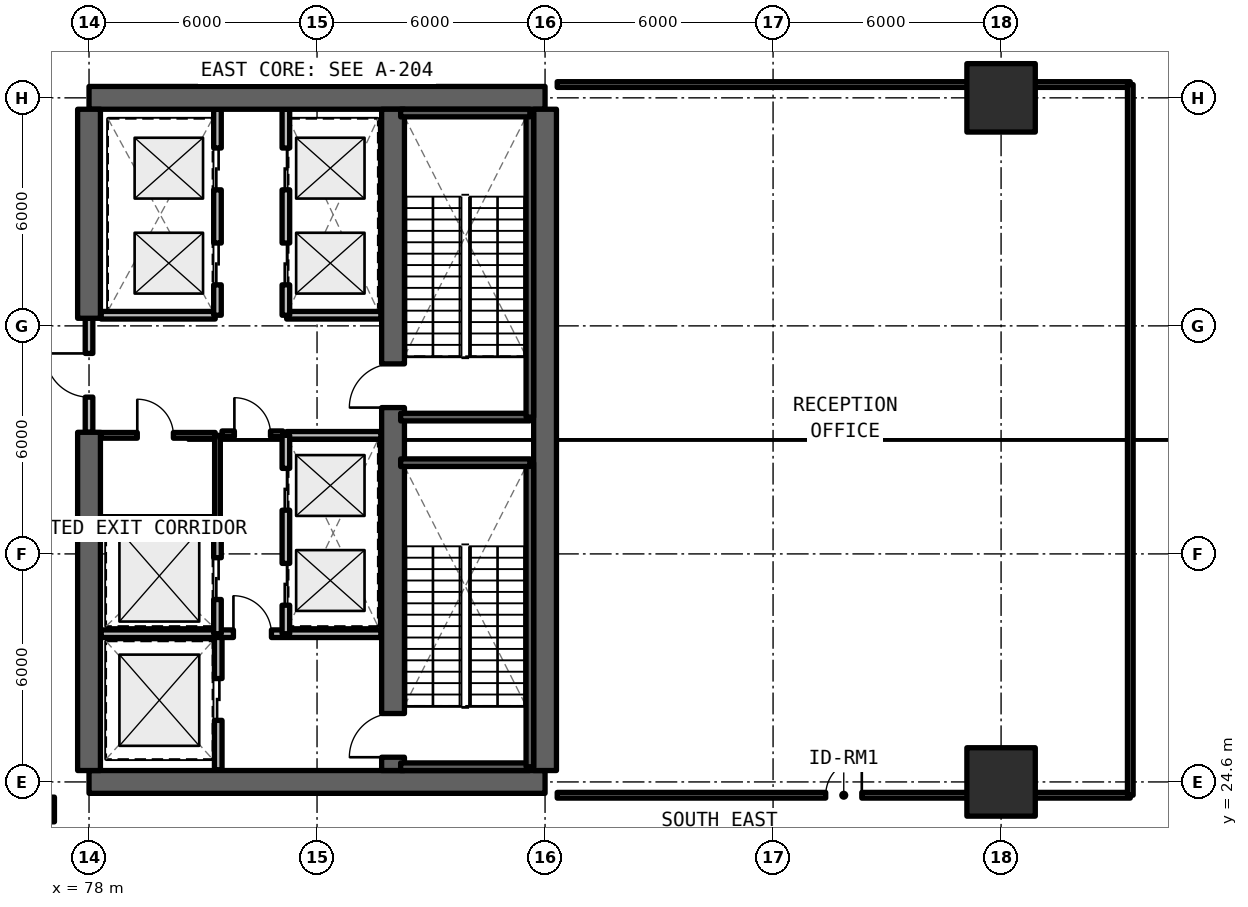
"""IFC4 building model, lengths in metres.
Left out: names, types, materials, properties, quantities, classifications, styles, units other than length and angle.
Written with IfcOpenShell. Run it as: python <this file> out.ifc"""

import sys

from ifc_helpers import new_model, si_unit, direction, frame, frame_2d, origin, origin_2d, place, context, subcontext, project, spatial, rectangle, extrude, element, fill, save


model = new_model("IFC4")
c1 = context("Model", 3, precision=1e-05, world=origin(), true_north=direction((0.0, 1.0)))
c2 = subcontext(c1, "Body", "Model", "MODEL_VIEW")
j1 = project(units=[si_unit("LENGTHUNIT", "METRE"), si_unit("PLANEANGLEUNIT", "RADIAN")], contexts=[c1])
p1 = place(None, origin())
s1 = spatial("IfcSite", under=j1, at=p1, CompositionType="ELEMENT")
p2 = place(p1, origin())
s2 = spatial("IfcBuilding", under=s1, at=p2, CompositionType="ELEMENT")
p3 = place(p2, origin())
s3 = spatial("IfcBuildingStorey", under=s2, at=p3, CompositionType="ELEMENT", Elevation=0.0)
for number, where, z_axis, x_axis in (
    (1, (78.0, 24.6, 0.0), (0.0, 0.0, 1.0), (1.0, 0.0, 0.0)),
    (2, (90.0, 42.6, 0.0), (0.0, 0.0, 1.0), (-1.0, 0.0, 0.0)),
):
    element("IfcWall", number, at=place(p3, frame(where, z_axis=z_axis, x_axis=x_axis)), inside=s3, PredefinedType="SHEAR", context=c2, shape_type="SweptSolid", body=[
        extrude(rectangle(XDim=12.0, YDim=0.6, at=frame_2d((6.0, 0.0))), origin(), (0.0, 0.0, 1.0), 4.95),
    ])
p4 = place(p3, frame((90.0, 24.9, 0.0), z_axis=(0.0, 0.0, 1.0), x_axis=(0.0, 1.0, 0.0)))
e3 = element("IfcWall", 3, at=p4, inside=s3, PredefinedType="SHEAR", context=c2, shape_type="SweptSolid", body=[
    extrude(rectangle(XDim=17.4, YDim=0.6, at=frame_2d((8.7, 0.0))), origin(), (0.0, 0.0, 1.0), 4.95),
])
p5 = place(p3, frame((78.0, 24.9, 0.0), z_axis=(0.0, 0.0, 1.0), x_axis=(0.0, 1.0, 0.0)))
e4 = element("IfcWall", 4, at=p5, inside=s3, PredefinedType="SHEAR", context=c2, shape_type="SweptSolid", body=[
    extrude(rectangle(XDim=8.9, YDim=0.6, at=frame_2d((4.45, 0.0))), origin(), (0.0, 0.0, 1.0), 4.95),
])
p6 = place(p3, frame((78.0, 36.8, 0.0), z_axis=(0.0, 0.0, 1.0), x_axis=(0.0, 1.0, 0.0)))
e5 = element("IfcWall", 5, at=p6, inside=s3, PredefinedType="SHEAR", context=c2, shape_type="SweptSolid", body=[
    extrude(rectangle(XDim=5.5, YDim=0.6, at=frame_2d((2.75, 0.0))), origin(), (0.0, 0.0, 1.0), 4.95),
])
p7 = place(p3, frame((86.0, 24.9, 0.0), z_axis=(0.0, 0.0, 1.0), x_axis=(0.0, 1.0, 0.0)))
e6 = element("IfcWall", 6, at=p7, inside=s3, PredefinedType="SHEAR", context=c2, shape_type="SweptSolid", body=[
    extrude(rectangle(XDim=17.4, YDim=0.6, at=frame_2d((8.7, 0.0))), origin(), (0.0, 0.0, 1.0), 4.95),
])
p8 = place(p7, frame((0.35, 0.0, 0.0)))
e7 = element("IfcOpeningElement", 7, at=p8, cuts=e6, PredefinedType="OPENING", context=c2, shape_type="SweptSolid", body=[
    extrude(rectangle(XDim=1.15, YDim=2.15, at=frame_2d((0.575, 1.075))), frame((0.0, 0.31, 0.0), z_axis=(0.0, -1.0, 0.0), x_axis=(1.0, 0.0, 0.0)), (0.0, 0.0, 1.0), 0.62),
])
p9 = place(p7, frame((9.55, 0.0, 0.0)))
e8 = element("IfcOpeningElement", 8, at=p9, cuts=e6, PredefinedType="OPENING", context=c2, shape_type="SweptSolid", body=[
    extrude(rectangle(XDim=1.15, YDim=2.15, at=frame_2d((0.575, 1.075))), frame((0.0, 0.31, 0.0), z_axis=(0.0, -1.0, 0.0), x_axis=(1.0, 0.0, 0.0)), (0.0, 0.0, 1.0), 0.62),
])
for number, where, z_axis, x_axis in (
    (9, (102.0, 24.6, 0.0), (0.0, 0.0, 1.0), (1.0, 0.0, 0.0)),
    (10, (102.0, 42.6, 0.0), (0.0, 0.0, 1.0), (1.0, 0.0, 0.0)),
):
    element("IfcColumn", number, at=place(p3, frame(where, z_axis=z_axis, x_axis=x_axis)), inside=s3, PredefinedType="COLUMN", context=c2, shape_type="SweptSolid", body=[
        extrude(rectangle(XDim=1.8, YDim=1.8, at=origin_2d()), origin(), (0.0, 0.0, 1.0), 4.95),
    ])
p10 = place(p3, frame((81.4, 24.92, 0.0), z_axis=(0.0, 0.0, 1.0), x_axis=(0.0, 1.0, 0.0)))
e11 = element("IfcWall", 11, at=p10, inside=s3, PredefinedType="SOLIDWALL", context=c2, shape_type="SweptSolid", body=[
    extrude(rectangle(XDim=3.58, YDim=0.2, at=frame_2d((1.79, 0.0))), origin(), (0.0, 0.0, 1.0), 3.89),
])
p11 = place(p10, frame((1.3, 0.0, 0.0)))
e12 = element("IfcOpeningElement", 12, at=p11, cuts=e11, PredefinedType="OPENING", context=c2, shape_type="SweptSolid", body=[
    extrude(rectangle(XDim=1.1, YDim=2.2, at=frame_2d((0.55, 1.1))), frame((0.0, 0.11, 0.0), z_axis=(0.0, -1.0, 0.0), x_axis=(1.0, 0.0, 0.0)), (0.0, 0.0, 1.0), 0.22),
])
p12 = place(p3, frame((78.32, 28.5, 0.0), z_axis=(0.0, 0.0, 1.0), x_axis=(1.0, 0.0, 0.0)))
e13 = element("IfcWall", 13, at=p12, inside=s3, PredefinedType="SOLIDWALL", context=c2, shape_type="SweptSolid", body=[
    extrude(rectangle(XDim=7.36, YDim=0.2, at=frame_2d((3.68, 0.0))), origin(), (0.0, 0.0, 1.0), 3.89),
])
p13 = place(p12, frame((3.48, 0.0, 0.0)))
e14 = element("IfcOpeningElement", 14, at=p13, cuts=e13, PredefinedType="OPENING", context=c2, shape_type="SweptSolid", body=[
    extrude(rectangle(XDim=1.0, YDim=2.15, at=frame_2d((0.5, 1.075))), frame((0.0, 0.11, 0.0), z_axis=(0.0, -1.0, 0.0), x_axis=(1.0, 0.0, 0.0)), (0.0, 0.0, 1.0), 0.22),
])
p14 = place(p3, frame((78.0, 33.8, 0.0), z_axis=(0.0, 0.0, 1.0), x_axis=(0.0, 1.0, 0.0)))
e15 = element("IfcWall", 15, at=p14, inside=s3, PredefinedType="SOLIDWALL", context=c2, shape_type="SweptSolid", body=[
    extrude(rectangle(XDim=3.0, YDim=0.2, at=frame_2d((1.5, 0.0))), origin(), (0.0, 0.0, 1.0), 3.89),
])
p15 = place(p14, frame((0.925, 0.0, 0.0)))
e16 = element("IfcOpeningElement", 16, at=p15, cuts=e15, PredefinedType="OPENING", context=c2, shape_type="SweptSolid", body=[
    extrude(rectangle(XDim=1.15, YDim=2.15, at=frame_2d((0.575, 1.075))), frame((0.0, 0.11, 0.0), z_axis=(0.0, -1.0, 0.0), x_axis=(1.0, 0.0, 0.0)), (0.0, 0.0, 1.0), 0.22),
])
p16 = place(p3, frame((81.5, 33.76, 0.0), z_axis=(0.0, 0.0, 1.0), x_axis=(1.0, 0.0, 0.0)))
e17 = element("IfcWall", 17, at=p16, inside=s3, PredefinedType="SOLIDWALL", context=c2, shape_type="SweptSolid", body=[
    extrude(rectangle(XDim=1.6, YDim=0.15, at=frame_2d((0.8, 0.0))), origin(), (0.0, 0.0, 1.0), 3.89),
])
p17 = place(p16, frame((0.325, 0.0, 0.0)))
e18 = element("IfcOpeningElement", 18, at=p17, cuts=e17, PredefinedType="OPENING", context=c2, shape_type="SweptSolid", body=[
    extrude(rectangle(XDim=0.95, YDim=2.15, at=frame_2d((0.475, 1.075))), frame((0.0, 0.085, 0.0), z_axis=(0.0, -1.0, 0.0), x_axis=(1.0, 0.0, 0.0)), (0.0, 0.0, 1.0), 0.17),
])
p18 = place(p3, frame((83.2, 33.72, 0.0), z_axis=(0.0, 0.0, 1.0), x_axis=(1.0, 0.0, 0.0)))
e19 = element("IfcWall", 19, at=p18, inside=s3, PredefinedType="SOLIDWALL", context=c2, shape_type="SweptSolid", body=[
    extrude(rectangle(XDim=2.48, YDim=0.2, at=frame_2d((1.24, 0.0))), origin(), (0.0, 0.0, 1.0), 3.89),
])
p19 = place(p3, frame((83.18, 28.5, 0.0), z_axis=(0.0, 0.0, 1.0), x_axis=(0.0, 1.0, 0.0)))
e20 = element("IfcWall", 20, at=p19, inside=s3, PredefinedType="SOLIDWALL", context=c2, shape_type="SweptSolid", body=[
    extrude(rectangle(XDim=5.22, YDim=0.2, at=frame_2d((2.61, 0.0))), origin(), (0.0, 0.0, 1.0), 3.89),
])
p20 = place(p19, frame((0.75, 0.0, 0.0)))
e21 = element("IfcOpeningElement", 21, at=p20, cuts=e20, PredefinedType="OPENING", context=c2, shape_type="SweptSolid", body=[
    extrude(rectangle(XDim=1.1, YDim=2.2, at=frame_2d((0.55, 1.1))), frame((0.0, 0.11, 0.0), z_axis=(0.0, -1.0, 0.0), x_axis=(1.0, 0.0, 0.0)), (0.0, 0.0, 1.0), 0.22),
])
p21 = place(p19, frame((3.25, 0.0, 0.0)))
e22 = element("IfcOpeningElement", 22, at=p21, cuts=e20, PredefinedType="OPENING", context=c2, shape_type="SweptSolid", body=[
    extrude(rectangle(XDim=1.1, YDim=2.2, at=frame_2d((0.55, 1.1))), frame((0.0, 0.11, 0.0), z_axis=(0.0, -1.0, 0.0), x_axis=(1.0, 0.0, 0.0)), (0.0, 0.0, 1.0), 0.22),
])
p22 = place(p3, frame((78.32, 31.48, 0.0), z_axis=(0.0, 0.0, 1.0), x_axis=(1.0, 0.0, 0.0)))
e23 = element("IfcWall", 23, at=p22, inside=s3, PredefinedType="SOLIDWALL", context=c2, shape_type="SweptSolid", body=[
    extrude(rectangle(XDim=3.0, YDim=0.2, at=frame_2d((1.5, 0.0))), origin(), (0.0, 0.0, 1.0), 3.89),
])
p23 = place(p3, frame((81.38, 28.5, 0.0), z_axis=(0.0, 0.0, 1.0), x_axis=(0.0, 1.0, 0.0)))
e24 = element("IfcWall", 24, at=p23, inside=s3, PredefinedType="SOLIDWALL", context=c2, shape_type="SweptSolid", body=[
    extrude(rectangle(XDim=2.98, YDim=0.2, at=frame_2d((1.49, 0.0))), origin(), (0.0, 0.0, 1.0), 3.89),
])
p24 = place(p23, frame((0.9, 0.0, 0.0)))
e25 = element("IfcOpeningElement", 25, at=p24, cuts=e24, PredefinedType="OPENING", context=c2, shape_type="SweptSolid", body=[
    extrude(rectangle(XDim=1.1, YDim=2.2, at=frame_2d((0.55, 1.1))), frame((0.0, 0.11, 0.0), z_axis=(0.0, -1.0, 0.0), x_axis=(1.0, 0.0, 0.0)), (0.0, 0.0, 1.0), 0.22),
])
p25 = place(p3, frame((81.38, 31.48, 0.0), z_axis=(0.0, 0.0, 1.0), x_axis=(0.0, 1.0, 0.0)))
e26 = element("IfcWall", 26, at=p25, inside=s3, PredefinedType="SOLIDWALL", context=c2, shape_type="SweptSolid", body=[
    extrude(rectangle(XDim=2.24, YDim=0.15, at=frame_2d((1.12, 0.0))), origin(), (0.0, 0.0, 1.0), 3.89),
])
p26 = place(p3, frame((78.32, 33.72, 0.0), z_axis=(0.0, 0.0, 1.0), x_axis=(1.0, 0.0, 0.0)))
e27 = element("IfcWall", 27, at=p26, inside=s3, PredefinedType="SOLIDWALL", context=c2, shape_type="SweptSolid", body=[
    extrude(rectangle(XDim=3.0, YDim=0.15, at=frame_2d((1.5, 0.0))), origin(), (0.0, 0.0, 1.0), 3.89),
])
p27 = place(p26, frame((0.95, 0.0, 0.0)))
e28 = element("IfcOpeningElement", 28, at=p27, cuts=e27, PredefinedType="OPENING", context=c2, shape_type="SweptSolid", body=[
    extrude(rectangle(XDim=0.95, YDim=2.15, at=frame_2d((0.475, 1.075))), frame((0.0, 0.085, 0.0), z_axis=(0.0, -1.0, 0.0), x_axis=(1.0, 0.0, 0.0)), (0.0, 0.0, 1.0), 0.17),
])
p28 = place(p3, frame((83.2, 36.88, 0.0), z_axis=(0.0, 0.0, 1.0), x_axis=(1.0, 0.0, 0.0)))
e29 = element("IfcWall", 29, at=p28, inside=s3, PredefinedType="SOLIDWALL", context=c2, shape_type="SweptSolid", body=[
    extrude(rectangle(XDim=2.48, YDim=0.2, at=frame_2d((1.24, 0.0))), origin(), (0.0, 0.0, 1.0), 3.89),
])
p29 = place(p3, frame((83.18, 36.88, 0.0), z_axis=(0.0, 0.0, 1.0), x_axis=(0.0, 1.0, 0.0)))
e30 = element("IfcWall", 30, at=p29, inside=s3, PredefinedType="SOLIDWALL", context=c2, shape_type="SweptSolid", body=[
    extrude(rectangle(XDim=5.42, YDim=0.2, at=frame_2d((2.71, 0.0))), origin(), (0.0, 0.0, 1.0), 3.89),
])
p30 = place(p29, frame((0.8, 0.0, 0.0)))
e31 = element("IfcOpeningElement", 31, at=p30, cuts=e30, PredefinedType="OPENING", context=c2, shape_type="SweptSolid", body=[
    extrude(rectangle(XDim=1.1, YDim=2.2, at=frame_2d((0.55, 1.1))), frame((0.0, 0.11, 0.0), z_axis=(0.0, -1.0, 0.0), x_axis=(1.0, 0.0, 0.0)), (0.0, 0.0, 1.0), 0.22),
])
p31 = place(p29, frame((3.3, 0.0, 0.0)))
e32 = element("IfcOpeningElement", 32, at=p31, cuts=e30, PredefinedType="OPENING", context=c2, shape_type="SweptSolid", body=[
    extrude(rectangle(XDim=1.1, YDim=2.2, at=frame_2d((0.55, 1.1))), frame((0.0, 0.11, 0.0), z_axis=(0.0, -1.0, 0.0), x_axis=(1.0, 0.0, 0.0)), (0.0, 0.0, 1.0), 0.22),
])
p32 = place(p3, frame((78.32, 36.88, 0.0), z_axis=(0.0, 0.0, 1.0), x_axis=(1.0, 0.0, 0.0)))
e33 = element("IfcWall", 33, at=p32, inside=s3, PredefinedType="SOLIDWALL", context=c2, shape_type="SweptSolid", body=[
    extrude(rectangle(XDim=3.0, YDim=0.2, at=frame_2d((1.5, 0.0))), origin(), (0.0, 0.0, 1.0), 3.89),
])
p33 = place(p3, frame((81.38, 36.88, 0.0), z_axis=(0.0, 0.0, 1.0), x_axis=(0.0, 1.0, 0.0)))
e34 = element("IfcWall", 34, at=p33, inside=s3, PredefinedType="SOLIDWALL", context=c2, shape_type="SweptSolid", body=[
    extrude(rectangle(XDim=5.42, YDim=0.2, at=frame_2d((2.71, 0.0))), origin(), (0.0, 0.0, 1.0), 3.89),
])
p34 = place(p33, frame((0.8, 0.0, 0.0)))
e35 = element("IfcOpeningElement", 35, at=p34, cuts=e34, PredefinedType="OPENING", context=c2, shape_type="SweptSolid", body=[
    extrude(rectangle(XDim=1.1, YDim=2.2, at=frame_2d((0.55, 1.1))), frame((0.0, 0.11, 0.0), z_axis=(0.0, -1.0, 0.0), x_axis=(1.0, 0.0, 0.0)), (0.0, 0.0, 1.0), 0.22),
])
p35 = place(p33, frame((3.3, 0.0, 0.0)))
e36 = element("IfcOpeningElement", 36, at=p35, cuts=e34, PredefinedType="OPENING", context=c2, shape_type="SweptSolid", body=[
    extrude(rectangle(XDim=1.1, YDim=2.2, at=frame_2d((0.55, 1.1))), frame((0.0, 0.11, 0.0), z_axis=(0.0, -1.0, 0.0), x_axis=(1.0, 0.0, 0.0)), (0.0, 0.0, 1.0), 0.22),
])
p36 = place(p3, frame((76.99, 0.3, 0.0), z_axis=(0.0, 0.0, 1.0), x_axis=(0.0, 1.0, 0.0)))
e37 = element("IfcWall", 37, at=p36, inside=s3, PredefinedType="SOLIDWALL", context=c2, shape_type="SweptSolid", body=[
    extrude(rectangle(XDim=23.9, YDim=0.2, at=frame_2d((11.95, 0.0))), origin(), (0.0, 0.0, 1.0), 3.89),
])
p37 = place(p36, frame((22.1, 0.0, 0.0)))
e38 = element("IfcOpeningElement", 38, at=p37, cuts=e37, PredefinedType="OPENING", context=c2, shape_type="SweptSolid", body=[
    extrude(rectangle(XDim=1.15, YDim=2.15, at=frame_2d((0.575, 1.075))), frame((0.0, 0.11, 0.0), z_axis=(0.0, -1.0, 0.0), x_axis=(1.0, 0.0, 0.0)), (0.0, 0.0, 1.0), 0.22),
])
p38 = place(p3, frame((90.32, 24.25, 0.0), z_axis=(0.0, 0.0, 1.0), x_axis=(1.0, 0.0, 0.0)))
e39 = element("IfcWall", 39, at=p38, inside=s3, PredefinedType="SOLIDWALL", context=c2, shape_type="SweptSolid", body=[
    extrude(rectangle(XDim=15.08, YDim=0.15, at=frame_2d((7.54, 0.0))), origin(), (0.0, 0.0, 1.0), 3.89),
])
p39 = place(p38, frame((7.065, 0.0, 0.0)))
e40 = element("IfcOpeningElement", 40, at=p39, cuts=e39, PredefinedType="OPENING", context=c2, shape_type="SweptSolid", body=[
    extrude(rectangle(XDim=0.95, YDim=2.15, at=frame_2d((0.475, 1.075))), frame((0.0, 0.085, 0.0), z_axis=(0.0, -1.0, 0.0), x_axis=(1.0, 0.0, 0.0)), (0.0, 0.0, 1.0), 0.17),
])
p40 = place(p3, frame((90.32, 42.95, 0.0), z_axis=(0.0, 0.0, 1.0), x_axis=(1.0, 0.0, 0.0)))
e41 = element("IfcWall", 41, at=p40, inside=s3, PredefinedType="SOLIDWALL", context=c2, shape_type="SweptSolid", body=[
    extrude(rectangle(XDim=15.08, YDim=0.15, at=frame_2d((7.54, 0.0))), origin(), (0.0, 0.0, 1.0), 3.89),
])
p41 = place(p3, frame((105.4, 24.25, 0.0), z_axis=(0.0, 0.0, 1.0), x_axis=(0.0, 1.0, 0.0)))
e42 = element("IfcWall", 42, at=p41, inside=s3, PredefinedType="SOLIDWALL", context=c2, shape_type="SweptSolid", body=[
    extrude(rectangle(XDim=18.7, YDim=0.15, at=frame_2d((9.35, 0.0))), origin(), (0.0, 0.0, 1.0), 3.89),
])
p42 = place(p3, frame((86.2, 25.0, 0.0), z_axis=(0.0, 0.0, 1.0), x_axis=(1.0, 0.0, 0.0)))
e43 = element("IfcWall", 43, at=p42, inside=s3, PredefinedType="SOLIDWALL", context=c2, shape_type="SweptSolid", body=[
    extrude(rectangle(XDim=3.4, YDim=0.2, at=frame_2d((1.7, 0.0))), origin(), (0.0, 0.0, 1.0), 4.95),
])
p43 = place(p3, frame((89.6, 25.0, 0.0), z_axis=(0.0, 0.0, 1.0), x_axis=(0.0, 1.0, 0.0)))
e44 = element("IfcWall", 44, at=p43, inside=s3, PredefinedType="SOLIDWALL", context=c2, shape_type="SweptSolid", body=[
    extrude(rectangle(XDim=8.0, YDim=0.2, at=frame_2d((4.0, 0.0))), origin(), (0.0, 0.0, 1.0), 4.95),
])
for number, where, z_axis, x_axis in (
    (45, (89.6, 33.0, 0.0), (0.0, 0.0, 1.0), (-1.0, 0.0, 0.0)),
    (46, (86.2, 34.2, 0.0), (0.0, 0.0, 1.0), (1.0, 0.0, 0.0)),
):
    element("IfcWall", number, at=place(p3, frame(where, z_axis=z_axis, x_axis=x_axis)), inside=s3, PredefinedType="SOLIDWALL", context=c2, shape_type="SweptSolid", body=[
        extrude(rectangle(XDim=3.4, YDim=0.2, at=frame_2d((1.7, 0.0))), origin(), (0.0, 0.0, 1.0), 4.95),
    ])
p44 = place(p3, frame((89.6, 34.2, 0.0), z_axis=(0.0, 0.0, 1.0), x_axis=(0.0, 1.0, 0.0)))
e47 = element("IfcWall", 47, at=p44, inside=s3, PredefinedType="SOLIDWALL", context=c2, shape_type="SweptSolid", body=[
    extrude(rectangle(XDim=8.0, YDim=0.2, at=frame_2d((4.0, 0.0))), origin(), (0.0, 0.0, 1.0), 4.95),
])
p45 = place(p3, frame((89.6, 42.2, 0.0), z_axis=(0.0, 0.0, 1.0), x_axis=(-1.0, 0.0, 0.0)))
e48 = element("IfcWall", 48, at=p45, inside=s3, PredefinedType="SOLIDWALL", context=c2, shape_type="SweptSolid", body=[
    extrude(rectangle(XDim=3.4, YDim=0.2, at=frame_2d((1.7, 0.0))), origin(), (0.0, 0.0, 1.0), 4.95),
])
p46 = place(p11, origin())
e49 = element("IfcDoor", 49, at=p46, inside=s3, OperationType="SLIDING_TO_LEFT", PredefinedType="DOOR", context=c2, shape_type="SweptSolid", body=[
    extrude(rectangle(XDim=1.1, YDim=2.2, at=frame_2d((0.55, 1.1))), frame((0.0, 0.025, 0.0), z_axis=(0.0, -1.0, 0.0), x_axis=(1.0, 0.0, 0.0)), (0.0, 0.0, 1.0), 0.05),
])
fill(e12, e49)
p47 = place(p13, origin())
e50 = element("IfcDoor", 50, at=p47, inside=s3, OperationType="SINGLE_SWING_LEFT", PredefinedType="DOOR", context=c2, shape_type="SweptSolid", body=[
    extrude(rectangle(XDim=1.0, YDim=2.15, at=frame_2d((0.5, 1.075))), frame((0.0, 0.025, 0.0), z_axis=(0.0, -1.0, 0.0), x_axis=(1.0, 0.0, 0.0)), (0.0, 0.0, 1.0), 0.05),
])
fill(e14, e50)
p48 = place(p15, origin())
e51 = element("IfcDoor", 51, at=p48, inside=s3, OperationType="SINGLE_SWING_RIGHT", PredefinedType="DOOR", context=c2, shape_type="SweptSolid", body=[
    extrude(rectangle(XDim=1.15, YDim=2.15, at=frame_2d((0.575, 1.075))), frame((0.0, 0.025, 0.0), z_axis=(0.0, -1.0, 0.0), x_axis=(1.0, 0.0, 0.0)), (0.0, 0.0, 1.0), 0.05),
])
fill(e16, e51)
p49 = place(p17, origin())
e52 = element("IfcDoor", 52, at=p49, inside=s3, OperationType="SINGLE_SWING_LEFT", PredefinedType="DOOR", context=c2, shape_type="SweptSolid", body=[
    extrude(rectangle(XDim=0.95, YDim=2.15, at=frame_2d((0.475, 1.075))), frame((0.0, 0.025, 0.0), z_axis=(0.0, -1.0, 0.0), x_axis=(1.0, 0.0, 0.0)), (0.0, 0.0, 1.0), 0.05),
])
fill(e18, e52)
p50 = place(p20, origin())
e53 = element("IfcDoor", 53, at=p50, inside=s3, OperationType="SLIDING_TO_LEFT", PredefinedType="DOOR", context=c2, shape_type="SweptSolid", body=[
    extrude(rectangle(XDim=1.1, YDim=2.2, at=frame_2d((0.55, 1.1))), frame((0.0, 0.025, 0.0), z_axis=(0.0, -1.0, 0.0), x_axis=(1.0, 0.0, 0.0)), (0.0, 0.0, 1.0), 0.05),
])
fill(e21, e53)
p51 = place(p21, origin())
e54 = element("IfcDoor", 54, at=p51, inside=s3, OperationType="SLIDING_TO_RIGHT", PredefinedType="DOOR", context=c2, shape_type="SweptSolid", body=[
    extrude(rectangle(XDim=1.1, YDim=2.2, at=frame_2d((0.55, 1.1))), frame((0.0, 0.025, 0.0), z_axis=(0.0, -1.0, 0.0), x_axis=(1.0, 0.0, 0.0)), (0.0, 0.0, 1.0), 0.05),
])
fill(e22, e54)
p52 = place(p24, origin())
e55 = element("IfcDoor", 55, at=p52, inside=s3, OperationType="SLIDING_TO_LEFT", PredefinedType="DOOR", context=c2, shape_type="SweptSolid", body=[
    extrude(rectangle(XDim=1.1, YDim=2.2, at=frame_2d((0.55, 1.1))), frame((0.0, 0.025, 0.0), z_axis=(0.0, -1.0, 0.0), x_axis=(1.0, 0.0, 0.0)), (0.0, 0.0, 1.0), 0.05),
])
fill(e25, e55)
p53 = place(p27, origin())
e56 = element("IfcDoor", 56, at=p53, inside=s3, OperationType="SINGLE_SWING_LEFT", PredefinedType="DOOR", context=c2, shape_type="SweptSolid", body=[
    extrude(rectangle(XDim=0.95, YDim=2.15, at=frame_2d((0.475, 1.075))), frame((0.0, 0.025, 0.0), z_axis=(0.0, -1.0, 0.0), x_axis=(1.0, 0.0, 0.0)), (0.0, 0.0, 1.0), 0.05),
])
fill(e28, e56)
p54 = place(p30, origin())
e57 = element("IfcDoor", 57, at=p54, inside=s3, OperationType="SLIDING_TO_LEFT", PredefinedType="DOOR", context=c2, shape_type="SweptSolid", body=[
    extrude(rectangle(XDim=1.1, YDim=2.2, at=frame_2d((0.55, 1.1))), frame((0.0, 0.025, 0.0), z_axis=(0.0, -1.0, 0.0), x_axis=(1.0, 0.0, 0.0)), (0.0, 0.0, 1.0), 0.05),
])
fill(e31, e57)
p55 = place(p31, origin())
e58 = element("IfcDoor", 58, at=p55, inside=s3, OperationType="SLIDING_TO_RIGHT", PredefinedType="DOOR", context=c2, shape_type="SweptSolid", body=[
    extrude(rectangle(XDim=1.1, YDim=2.2, at=frame_2d((0.55, 1.1))), frame((0.0, 0.025, 0.0), z_axis=(0.0, -1.0, 0.0), x_axis=(1.0, 0.0, 0.0)), (0.0, 0.0, 1.0), 0.05),
])
fill(e32, e58)
p56 = place(p34, origin())
e59 = element("IfcDoor", 59, at=p56, inside=s3, OperationType="SLIDING_TO_LEFT", PredefinedType="DOOR", context=c2, shape_type="SweptSolid", body=[
    extrude(rectangle(XDim=1.1, YDim=2.2, at=frame_2d((0.55, 1.1))), frame((0.0, 0.025, 0.0), z_axis=(0.0, -1.0, 0.0), x_axis=(1.0, 0.0, 0.0)), (0.0, 0.0, 1.0), 0.05),
])
fill(e35, e59)
p57 = place(p35, origin())
e60 = element("IfcDoor", 60, at=p57, inside=s3, OperationType="SLIDING_TO_RIGHT", PredefinedType="DOOR", context=c2, shape_type="SweptSolid", body=[
    extrude(rectangle(XDim=1.1, YDim=2.2, at=frame_2d((0.55, 1.1))), frame((0.0, 0.025, 0.0), z_axis=(0.0, -1.0, 0.0), x_axis=(1.0, 0.0, 0.0)), (0.0, 0.0, 1.0), 0.05),
])
fill(e36, e60)
p58 = place(p39, frame((0.95, 0.0, 0.0), z_axis=(0.0, 0.0, 1.0), x_axis=(-1.0, 0.0, 0.0)))
e61 = element("IfcDoor", 61, at=p58, inside=s3, OperationType="SINGLE_SWING_RIGHT", PredefinedType="DOOR", context=c2, shape_type="SweptSolid", body=[
    extrude(rectangle(XDim=0.95, YDim=2.15, at=frame_2d((0.475, 1.075))), frame((0.0, 0.025, 0.0), z_axis=(0.0, -1.0, 0.0), x_axis=(1.0, 0.0, 0.0)), (0.0, 0.0, 1.0), 0.05),
])
fill(e40, e61)
p59 = place(p8, origin())
e62 = element("IfcDoor", 62, at=p59, inside=s3, OperationType="SINGLE_SWING_LEFT", PredefinedType="DOOR", context=c2, shape_type="SweptSolid", body=[
    extrude(rectangle(XDim=1.15, YDim=2.15, at=frame_2d((0.575, 1.075))), frame((0.0, 0.025, 0.0), z_axis=(0.0, -1.0, 0.0), x_axis=(1.0, 0.0, 0.0)), (0.0, 0.0, 1.0), 0.05),
])
fill(e7, e62)
p60 = place(p9, origin())
e63 = element("IfcDoor", 63, at=p60, inside=s3, OperationType="SINGLE_SWING_RIGHT", PredefinedType="DOOR", context=c2, shape_type="SweptSolid", body=[
    extrude(rectangle(XDim=1.15, YDim=2.15, at=frame_2d((0.575, 1.075))), frame((0.0, 0.025, 0.0), z_axis=(0.0, -1.0, 0.0), x_axis=(1.0, 0.0, 0.0)), (0.0, 0.0, 1.0), 0.05),
])
fill(e8, e63)
save(model, sys.argv[1])
